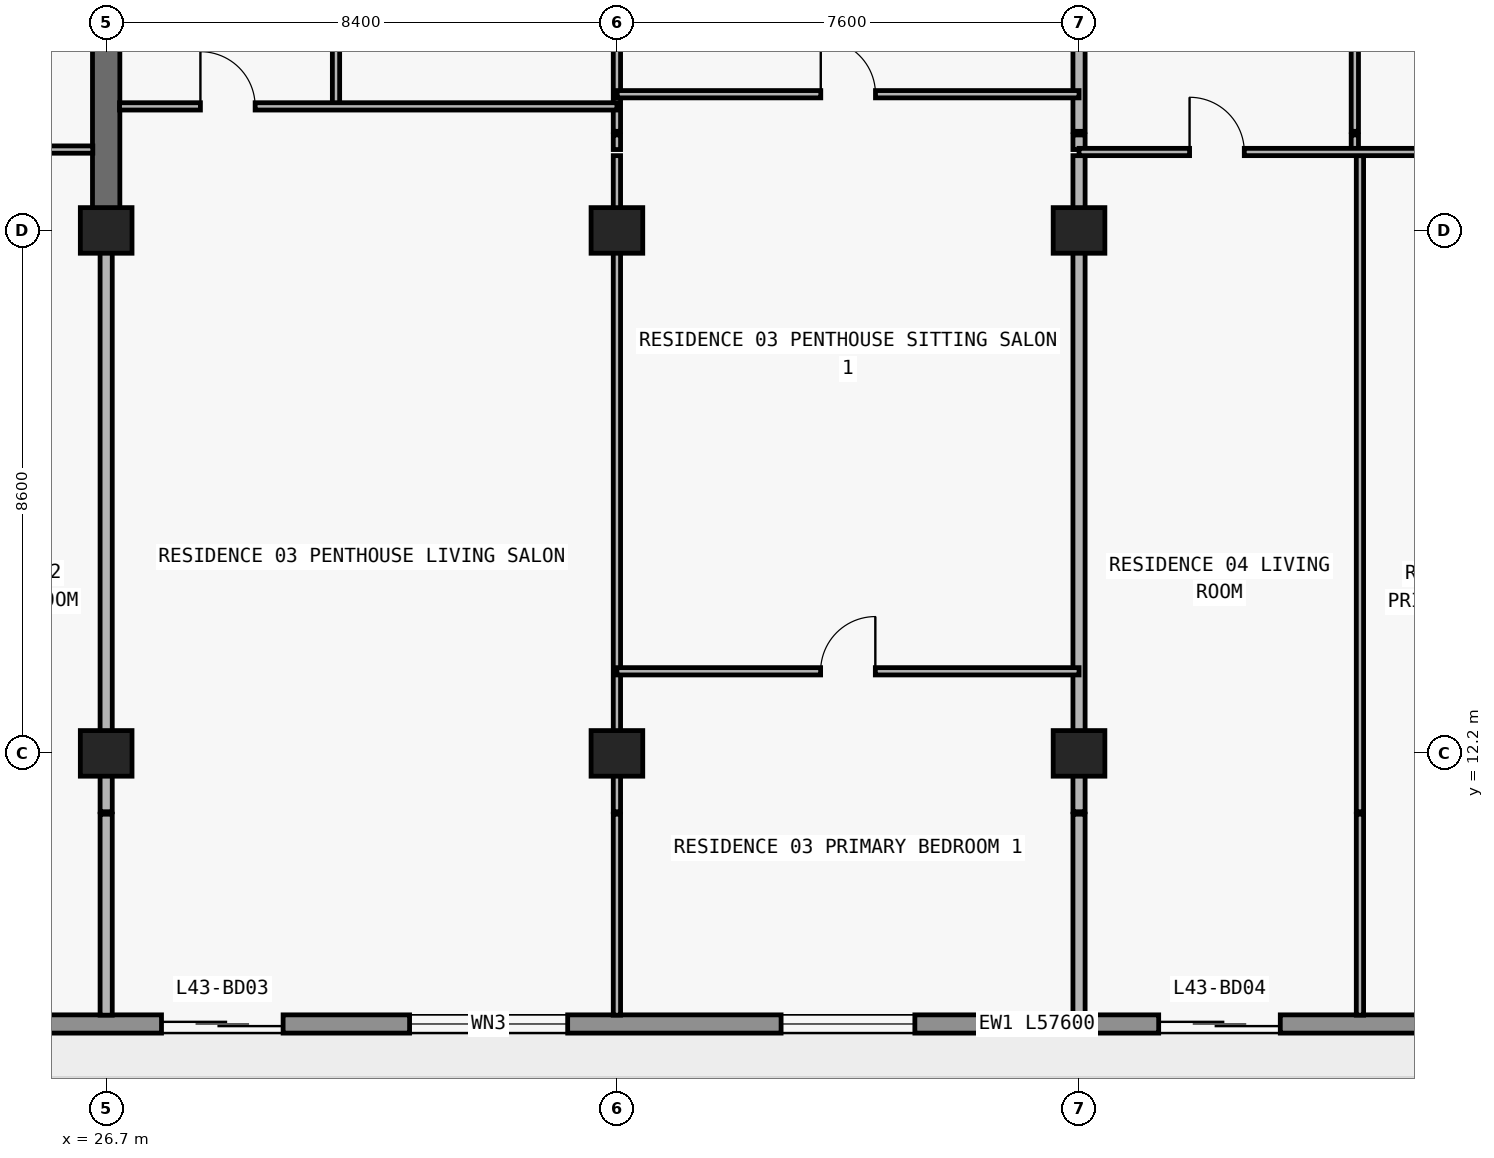
"""IFC4 building model, lengths in metres.
Left out: names, types, materials, properties, quantities, classifications, styles, units other than length and angle.
Written with IfcOpenShell. Run it as: python <this file> out.ifc"""

import sys

from ifc_helpers import new_model, si_unit, direction, frame, frame_2d, origin, origin_2d, place, context, subcontext, project, spatial, rectangle, extrude, element, fill, save


model = new_model("IFC4")
c1 = context("Model", 3, precision=1e-05, world=origin(), true_north=direction((0.0, 1.0)))
c2 = subcontext(c1, "Body", "Model", "MODEL_VIEW")
j1 = project(units=[si_unit("LENGTHUNIT", "METRE"), si_unit("PLANEANGLEUNIT", "RADIAN")], contexts=[c1])
p1 = place(None, origin())
s1 = spatial("IfcSite", under=j1, at=p1, CompositionType="ELEMENT")
p2 = place(p1, origin())
s2 = spatial("IfcBuilding", under=s1, at=p2, CompositionType="ELEMENT")
p3 = place(p2, frame((0.0, 0.0, 157.2)))
s3 = spatial("IfcBuildingStorey", under=s2, at=p3, CompositionType="ELEMENT", Elevation=157.2)
for number, where, z_axis, x_axis in (
    (1, (26.7, 12.2, 0.0), (0.0, 0.0, 1.0), (1.0, 0.0, 0.0)),
    (2, (35.1, 12.2, 0.0), (0.0, 0.0, 1.0), (1.0, 0.0, 0.0)),
    (3, (42.7, 12.2, 0.0), (0.0, 0.0, 1.0), (1.0, 0.0, 0.0)),
    (4, (26.7, 20.8, 0.0), (0.0, 0.0, 1.0), (1.0, 0.0, 0.0)),
    (5, (35.1, 20.8, 0.0), (0.0, 0.0, 1.0), (1.0, 0.0, 0.0)),
    (6, (42.7, 20.8, 0.0), (0.0, 0.0, 1.0), (1.0, 0.0, 0.0)),
):
    element("IfcColumn", number, at=place(p3, frame(where, z_axis=z_axis, x_axis=x_axis)), inside=s3, PredefinedType="COLUMN", context=c2, shape_type="SweptSolid", body=[
        extrude(rectangle(XDim=0.85, YDim=0.75, at=origin_2d()), origin(), (0.0, 0.0, 1.0), 3.05),
    ])
p4 = place(p3, frame((26.7, 20.8, 0.0), z_axis=(0.0, 0.0, 1.0), x_axis=(0.0, 1.0, 0.0)))
e7 = element("IfcWall", 7, at=p4, inside=s3, PredefinedType="SHEAR", context=c2, shape_type="SweptSolid", body=[
    extrude(rectangle(XDim=8.6, YDim=0.45, at=frame_2d((4.3, 0.0))), origin(), (0.0, 0.0, 1.0), 3.05),
])
p5 = place(p3, frame((67.7, 7.75, 0.0), z_axis=(0.0, 0.0, 1.0), x_axis=(-1.0, 0.0, 0.0)))
e8 = element("IfcWall", 8, at=p5, inside=s3, PredefinedType="STANDARD", context=c2, shape_type="SweptSolid", body=[
    extrude(rectangle(XDim=57.6, YDim=0.3, at=frame_2d((28.8, 0.0))), origin(), (0.0, 0.0, 1.0), 3.05),
])
p6 = place(p5, frame((54.673, 0.0, 0.0)))
e9 = element("IfcOpeningElement", 9, at=p6, cuts=e8, PredefinedType="OPENING", context=c2, shape_type="SweptSolid", body=[
    extrude(rectangle(XDim=2.0, YDim=2.3, at=frame_2d((1.0, 1.15))), frame((0.0, 0.16, 0.0), z_axis=(0.0, -1.0, 0.0), x_axis=(1.0, 0.0, 0.0)), (0.0, 0.0, 1.0), 0.32),
])
p7 = place(p5, frame((50.473, 0.0, 0.85)))
e10 = element("IfcOpeningElement", 10, at=p7, cuts=e8, PredefinedType="OPENING", context=c2, shape_type="SweptSolid", body=[
    extrude(rectangle(XDim=2.2, YDim=1.55, at=frame_2d((1.1, 0.775))), frame((0.0, 0.16, 0.0), z_axis=(0.0, -1.0, 0.0), x_axis=(1.0, 0.0, 0.0)), (0.0, 0.0, 1.0), 0.32),
])
p8 = place(p5, frame((46.09, 0.0, 0.0)))
e11 = element("IfcOpeningElement", 11, at=p8, cuts=e8, PredefinedType="OPENING", context=c2, shape_type="SweptSolid", body=[
    extrude(rectangle(XDim=2.0, YDim=2.3, at=frame_2d((1.0, 1.15))), frame((0.0, 0.16, 0.0), z_axis=(0.0, -1.0, 0.0), x_axis=(1.0, 0.0, 0.0)), (0.0, 0.0, 1.0), 0.32),
])
p9 = place(p5, frame((41.99, 0.0, 0.85)))
e12 = element("IfcOpeningElement", 12, at=p9, cuts=e8, PredefinedType="OPENING", context=c2, shape_type="SweptSolid", body=[
    extrude(rectangle(XDim=1.8, YDim=1.55, at=frame_2d((0.9, 0.775))), frame((0.0, 0.16, 0.0), z_axis=(0.0, -1.0, 0.0), x_axis=(1.0, 0.0, 0.0)), (0.0, 0.0, 1.0), 0.32),
])
p10 = place(p5, frame((38.09, 0.0, 0.0)))
e13 = element("IfcOpeningElement", 13, at=p10, cuts=e8, PredefinedType="OPENING", context=c2, shape_type="SweptSolid", body=[
    extrude(rectangle(XDim=2.0, YDim=2.3, at=frame_2d((1.0, 1.15))), frame((0.0, 0.16, 0.0), z_axis=(0.0, -1.0, 0.0), x_axis=(1.0, 0.0, 0.0)), (0.0, 0.0, 1.0), 0.32),
])
p11 = place(p5, frame((33.41, 0.0, 0.65)))
e14 = element("IfcOpeningElement", 14, at=p11, cuts=e8, PredefinedType="OPENING", context=c2, shape_type="SweptSolid", body=[
    extrude(rectangle(XDim=2.6, YDim=1.85, at=frame_2d((1.3, 0.925))), frame((0.0, 0.16, 0.0), z_axis=(0.0, -1.0, 0.0), x_axis=(1.0, 0.0, 0.0)), (0.0, 0.0, 1.0), 0.32),
])
p12 = place(p5, frame((27.7, 0.0, 0.85)))
e15 = element("IfcOpeningElement", 15, at=p12, cuts=e8, PredefinedType="OPENING", context=c2, shape_type="SweptSolid", body=[
    extrude(rectangle(XDim=2.2, YDim=1.55, at=frame_2d((1.1, 0.775))), frame((0.0, 0.16, 0.0), z_axis=(0.0, -1.0, 0.0), x_axis=(1.0, 0.0, 0.0)), (0.0, 0.0, 1.0), 0.32),
])
p13 = place(p5, frame((21.69, 0.0, 0.0)))
e16 = element("IfcOpeningElement", 16, at=p13, cuts=e8, PredefinedType="OPENING", context=c2, shape_type="SweptSolid", body=[
    extrude(rectangle(XDim=2.0, YDim=2.3, at=frame_2d((1.0, 1.15))), frame((0.0, 0.16, 0.0), z_axis=(0.0, -1.0, 0.0), x_axis=(1.0, 0.0, 0.0)), (0.0, 0.0, 1.0), 0.32),
])
p14 = place(p5, frame((17.59, 0.0, 0.85)))
e17 = element("IfcOpeningElement", 17, at=p14, cuts=e8, PredefinedType="OPENING", context=c2, shape_type="SweptSolid", body=[
    extrude(rectangle(XDim=1.8, YDim=1.55, at=frame_2d((0.9, 0.775))), frame((0.0, 0.16, 0.0), z_axis=(0.0, -1.0, 0.0), x_axis=(1.0, 0.0, 0.0)), (0.0, 0.0, 1.0), 0.32),
])
p15 = place(p5, frame((13.626, 0.0, 0.0)))
e18 = element("IfcOpeningElement", 18, at=p15, cuts=e8, PredefinedType="OPENING", context=c2, shape_type="SweptSolid", body=[
    extrude(rectangle(XDim=2.0, YDim=2.3, at=frame_2d((1.0, 1.15))), frame((0.0, 0.16, 0.0), z_axis=(0.0, -1.0, 0.0), x_axis=(1.0, 0.0, 0.0)), (0.0, 0.0, 1.0), 0.32),
])
p16 = place(p5, frame((9.326, 0.0, 0.85)))
e19 = element("IfcOpeningElement", 19, at=p16, cuts=e8, PredefinedType="OPENING", context=c2, shape_type="SweptSolid", body=[
    extrude(rectangle(XDim=2.2, YDim=1.55, at=frame_2d((1.1, 0.775))), frame((0.0, 0.16, 0.0), z_axis=(0.0, -1.0, 0.0), x_axis=(1.0, 0.0, 0.0)), (0.0, 0.0, 1.0), 0.32),
])
p17 = place(p5, frame((4.945, 0.0, 0.0)))
e20 = element("IfcOpeningElement", 20, at=p17, cuts=e8, PredefinedType="OPENING", context=c2, shape_type="SweptSolid", body=[
    extrude(rectangle(XDim=2.0, YDim=2.3, at=frame_2d((1.0, 1.15))), frame((0.0, 0.16, 0.0), z_axis=(0.0, -1.0, 0.0), x_axis=(1.0, 0.0, 0.0)), (0.0, 0.0, 1.0), 0.32),
])
p18 = place(p5, frame((0.945, 0.0, 0.85)))
e21 = element("IfcOpeningElement", 21, at=p18, cuts=e8, PredefinedType="OPENING", context=c2, shape_type="SweptSolid", body=[
    extrude(rectangle(XDim=1.8, YDim=1.55, at=frame_2d((0.9, 0.775))), frame((0.0, 0.16, 0.0), z_axis=(0.0, -1.0, 0.0), x_axis=(1.0, 0.0, 0.0)), (0.0, 0.0, 1.0), 0.32),
])
p19 = place(p3, frame((26.7, 7.895, 0.0), z_axis=(0.0, 0.0, 1.0), x_axis=(0.0, 1.0, 0.0)))
e22 = element("IfcWall", 22, at=p19, inside=s3, PredefinedType="PARTITIONING", context=c2, shape_type="SweptSolid", body=[
    extrude(rectangle(XDim=3.305, YDim=0.2, at=frame_2d((1.652, 0.0))), origin(), (0.0, 0.0, 1.0), 3.05),
])
p20 = place(p3, frame((26.7, 11.24, 0.0), z_axis=(0.0, 0.0, 1.0), x_axis=(0.0, 1.0, 0.0)))
e23 = element("IfcWall", 23, at=p20, inside=s3, PredefinedType="PARTITIONING", context=c2, shape_type="SweptSolid", body=[
    extrude(rectangle(XDim=9.555, YDim=0.2, at=frame_2d((4.777, 0.0))), origin(), (0.0, 0.0, 1.0), 2.263),
])
p21 = place(p3, frame((30.48, 22.84, 0.0), z_axis=(0.0, 0.0, 1.0), x_axis=(0.0, 1.0, 0.0)))
e24 = element("IfcWall", 24, at=p21, inside=s3, PredefinedType="PARTITIONING", context=c2, shape_type="SweptSolid", body=[
    extrude(rectangle(XDim=4.34, YDim=0.12, at=frame_2d((2.17, 0.0))), origin(), (0.0, 0.0, 1.0), 3.05),
])
p22 = place(p21, frame((1.72, 0.0, 0.0)))
e25 = element("IfcOpeningElement", 25, at=p22, cuts=e24, PredefinedType="OPENING", context=c2, shape_type="SweptSolid", body=[
    extrude(rectangle(XDim=0.9, YDim=2.15, at=frame_2d((0.45, 1.075))), frame((0.0, 0.07, 0.0), z_axis=(0.0, -1.0, 0.0), x_axis=(1.0, 0.0, 0.0)), (0.0, 0.0, 1.0), 0.14),
])
p23 = place(p3, frame((35.1, 7.895, 0.0), z_axis=(0.0, 0.0, 1.0), x_axis=(0.0, 1.0, 0.0)))
e26 = element("IfcWall", 26, at=p23, inside=s3, PredefinedType="PARTITIONING", context=c2, shape_type="SweptSolid", body=[
    extrude(rectangle(XDim=3.305, YDim=0.12, at=frame_2d((1.652, 0.0))), origin(), (0.0, 0.0, 1.0), 3.05),
])
p24 = place(p3, frame((35.1, 11.24, 0.0), z_axis=(0.0, 0.0, 1.0), x_axis=(0.0, 1.0, 0.0)))
e27 = element("IfcWall", 27, at=p24, inside=s3, PredefinedType="PARTITIONING", context=c2, shape_type="SweptSolid", body=[
    extrude(rectangle(XDim=10.79, YDim=0.12, at=frame_2d((5.395, 0.0))), origin(), (0.0, 0.0, 1.0), 2.263),
])
p25 = place(p3, frame((35.1, 22.13, 0.0), z_axis=(0.0, 0.0, 1.0), x_axis=(0.0, 1.0, 0.0)))
e28 = element("IfcWall", 28, at=p25, inside=s3, PredefinedType="PARTITIONING", context=c2, shape_type="SweptSolid", body=[
    extrude(rectangle(XDim=0.24, YDim=0.12, at=frame_2d((0.12, 0.0))), origin(), (0.0, 0.0, 1.0), 2.263),
])
p26 = place(p3, frame((35.1, 22.43, 0.0), z_axis=(0.0, 0.0, 1.0), x_axis=(0.0, 1.0, 0.0)))
e29 = element("IfcWall", 29, at=p26, inside=s3, PredefinedType="PARTITIONING", context=c2, shape_type="SweptSolid", body=[
    extrude(rectangle(XDim=4.75, YDim=0.12, at=frame_2d((2.375, 0.0))), origin(), (0.0, 0.0, 1.0), 2.263),
])
p27 = place(p26, frame((2.23, 0.0, 0.0)))
e30 = element("IfcOpeningElement", 30, at=p27, cuts=e29, PredefinedType="OPENING", context=c2, shape_type="SweptSolid", body=[
    extrude(rectangle(XDim=0.9, YDim=2.15, at=frame_2d((0.45, 1.075))), frame((0.0, 0.07, 0.0), z_axis=(0.0, -1.0, 0.0), x_axis=(1.0, 0.0, 0.0)), (0.0, 0.0, 1.0), 0.14),
])
p28 = place(p3, frame((42.7, 7.895, 0.0), z_axis=(0.0, 0.0, 1.0), x_axis=(0.0, 1.0, 0.0)))
e31 = element("IfcWall", 31, at=p28, inside=s3, PredefinedType="PARTITIONING", context=c2, shape_type="SweptSolid", body=[
    extrude(rectangle(XDim=3.305, YDim=0.2, at=frame_2d((1.652, 0.0))), origin(), (0.0, 0.0, 1.0), 3.05),
])
p29 = place(p3, frame((42.7, 11.24, 0.0), z_axis=(0.0, 0.0, 1.0), x_axis=(0.0, 1.0, 0.0)))
e32 = element("IfcWall", 32, at=p29, inside=s3, PredefinedType="PARTITIONING", context=c2, shape_type="SweptSolid", body=[
    extrude(rectangle(XDim=10.79, YDim=0.2, at=frame_2d((5.395, 0.0))), origin(), (0.0, 0.0, 1.0), 2.263),
])
p30 = place(p3, frame((42.7, 22.13, 0.0), z_axis=(0.0, 0.0, 1.0), x_axis=(0.0, 1.0, 0.0)))
e33 = element("IfcWall", 33, at=p30, inside=s3, PredefinedType="PARTITIONING", context=c2, shape_type="SweptSolid", body=[
    extrude(rectangle(XDim=0.24, YDim=0.2, at=frame_2d((0.12, 0.0))), origin(), (0.0, 0.0, 1.0), 2.263),
])
p31 = place(p3, frame((42.7, 22.43, 0.0), z_axis=(0.0, 0.0, 1.0), x_axis=(0.0, 1.0, 0.0)))
e34 = element("IfcWall", 34, at=p31, inside=s3, PredefinedType="PARTITIONING", context=c2, shape_type="SweptSolid", body=[
    extrude(rectangle(XDim=4.75, YDim=0.2, at=frame_2d((2.375, 0.0))), origin(), (0.0, 0.0, 1.0), 2.263),
])
p32 = place(p3, frame((47.236, 22.13, 0.0), z_axis=(0.0, 0.0, 1.0), x_axis=(0.0, 1.0, 0.0)))
e35 = element("IfcWall", 35, at=p32, inside=s3, PredefinedType="PARTITIONING", context=c2, shape_type="SweptSolid", body=[
    extrude(rectangle(XDim=0.24, YDim=0.12, at=frame_2d((0.12, 0.0))), origin(), (0.0, 0.0, 1.0), 3.05),
])
p33 = place(p3, frame((47.236, 22.43, 0.0), z_axis=(0.0, 0.0, 1.0), x_axis=(0.0, 1.0, 0.0)))
e36 = element("IfcWall", 36, at=p33, inside=s3, PredefinedType="PARTITIONING", context=c2, shape_type="SweptSolid", body=[
    extrude(rectangle(XDim=4.75, YDim=0.12, at=frame_2d((2.375, 0.0))), origin(), (0.0, 0.0, 1.0), 3.05),
])
p34 = place(p33, frame((1.925, 0.0, 0.0)))
e37 = element("IfcOpeningElement", 37, at=p34, cuts=e36, PredefinedType="OPENING", context=c2, shape_type="SweptSolid", body=[
    extrude(rectangle(XDim=0.9, YDim=2.15, at=frame_2d((0.45, 1.075))), frame((0.0, 0.07, 0.0), z_axis=(0.0, -1.0, 0.0), x_axis=(1.0, 0.0, 0.0)), (0.0, 0.0, 1.0), 0.14),
])
p35 = place(p3, frame((47.32, 7.895, 0.0), z_axis=(0.0, 0.0, 1.0), x_axis=(0.0, 1.0, 0.0)))
e38 = element("IfcWall", 38, at=p35, inside=s3, PredefinedType="PARTITIONING", context=c2, shape_type="SweptSolid", body=[
    extrude(rectangle(XDim=3.305, YDim=0.12, at=frame_2d((1.652, 0.0))), origin(), (0.0, 0.0, 1.0), 3.05),
])
p36 = place(p3, frame((47.32, 11.24, 0.0), z_axis=(0.0, 0.0, 1.0), x_axis=(0.0, 1.0, 0.0)))
e39 = element("IfcWall", 39, at=p36, inside=s3, PredefinedType="PARTITIONING", context=c2, shape_type="SweptSolid", body=[
    extrude(rectangle(XDim=10.79, YDim=0.12, at=frame_2d((5.395, 0.0))), origin(), (0.0, 0.0, 1.0), 3.05),
])
p37 = place(p3, frame((35.1, 13.55, 0.0), z_axis=(0.0, 0.0, 1.0), x_axis=(1.0, 0.0, 0.0)))
e40 = element("IfcWall", 40, at=p37, inside=s3, PredefinedType="PARTITIONING", context=c2, shape_type="SweptSolid", body=[
    extrude(rectangle(XDim=7.6, YDim=0.12, at=frame_2d((3.8, 0.0))), origin(), (0.0, 0.0, 1.0), 3.05),
])
p38 = place(p37, frame((3.35, 0.0, 0.0)))
e41 = element("IfcOpeningElement", 41, at=p38, cuts=e40, PredefinedType="OPENING", context=c2, shape_type="SweptSolid", body=[
    extrude(rectangle(XDim=0.9, YDim=2.15, at=frame_2d((0.45, 1.075))), frame((0.0, 0.07, 0.0), z_axis=(0.0, -1.0, 0.0), x_axis=(1.0, 0.0, 0.0)), (0.0, 0.0, 1.0), 0.14),
])
p39 = place(p3, frame((42.7, 22.09, 0.0), z_axis=(0.0, 0.0, 1.0), x_axis=(1.0, 0.0, 0.0)))
e42 = element("IfcWall", 42, at=p39, inside=s3, PredefinedType="PARTITIONING", context=c2, shape_type="SweptSolid", body=[
    extrude(rectangle(XDim=8.18, YDim=0.12, at=frame_2d((4.09, 0.0))), origin(), (0.0, 0.0, 1.0), 3.05),
])
p40 = place(p39, frame((1.818, 0.0, 0.0)))
e43 = element("IfcOpeningElement", 43, at=p40, cuts=e42, PredefinedType="OPENING", context=c2, shape_type="SweptSolid", body=[
    extrude(rectangle(XDim=0.9, YDim=2.15, at=frame_2d((0.45, 1.075))), frame((0.0, 0.07, 0.0), z_axis=(0.0, -1.0, 0.0), x_axis=(1.0, 0.0, 0.0)), (0.0, 0.0, 1.0), 0.14),
])
p41 = place(p39, frame((5.95, 0.0, 0.0)))
e44 = element("IfcOpeningElement", 44, at=p41, cuts=e42, PredefinedType="OPENING", context=c2, shape_type="SweptSolid", body=[
    extrude(rectangle(XDim=0.9, YDim=2.15, at=frame_2d((0.45, 1.075))), frame((0.0, 0.07, 0.0), z_axis=(0.0, -1.0, 0.0), x_axis=(1.0, 0.0, 0.0)), (0.0, 0.0, 1.0), 0.14),
])
p42 = place(p3, frame((18.3, 22.13, 0.0), z_axis=(0.0, 0.0, 1.0), x_axis=(1.0, 0.0, 0.0)))
e45 = element("IfcWall", 45, at=p42, inside=s3, PredefinedType="PARTITIONING", context=c2, shape_type="SweptSolid", body=[
    extrude(rectangle(XDim=8.18, YDim=0.12, at=frame_2d((4.09, 0.0))), origin(), (0.0, 0.0, 1.0), 3.05),
])
p43 = place(p42, frame((1.86, 0.0, 0.0)))
e46 = element("IfcOpeningElement", 46, at=p43, cuts=e45, PredefinedType="OPENING", context=c2, shape_type="SweptSolid", body=[
    extrude(rectangle(XDim=0.9, YDim=2.15, at=frame_2d((0.45, 1.075))), frame((0.0, 0.07, 0.0), z_axis=(0.0, -1.0, 0.0), x_axis=(1.0, 0.0, 0.0)), (0.0, 0.0, 1.0), 0.14),
])
p44 = place(p42, frame((6.033, 0.0, 0.0)))
e47 = element("IfcOpeningElement", 47, at=p44, cuts=e45, PredefinedType="OPENING", context=c2, shape_type="SweptSolid", body=[
    extrude(rectangle(XDim=0.9, YDim=2.15, at=frame_2d((0.45, 1.075))), frame((0.0, 0.07, 0.0), z_axis=(0.0, -1.0, 0.0), x_axis=(1.0, 0.0, 0.0)), (0.0, 0.0, 1.0), 0.14),
])
p45 = place(p3, frame((26.92, 22.84, 0.0), z_axis=(0.0, 0.0, 1.0), x_axis=(1.0, 0.0, 0.0)))
e48 = element("IfcWall", 48, at=p45, inside=s3, PredefinedType="PARTITIONING", context=c2, shape_type="SweptSolid", body=[
    extrude(rectangle(XDim=8.18, YDim=0.12, at=frame_2d((4.09, 0.0))), origin(), (0.0, 0.0, 1.0), 3.05),
])
p46 = place(p45, frame((1.33, 0.0, 0.0)))
e49 = element("IfcOpeningElement", 49, at=p46, cuts=e48, PredefinedType="OPENING", context=c2, shape_type="SweptSolid", body=[
    extrude(rectangle(XDim=0.9, YDim=2.15, at=frame_2d((0.45, 1.075))), frame((0.0, 0.07, 0.0), z_axis=(0.0, -1.0, 0.0), x_axis=(1.0, 0.0, 0.0)), (0.0, 0.0, 1.0), 0.14),
])
p47 = place(p3, frame((35.105, 23.04, 0.0), z_axis=(0.0, 0.0, 1.0), x_axis=(1.0, 0.0, 0.0)))
e50 = element("IfcWall", 50, at=p47, inside=s3, PredefinedType="PARTITIONING", context=c2, shape_type="SweptSolid", body=[
    extrude(rectangle(XDim=7.595, YDim=0.12, at=frame_2d((3.797, 0.0))), origin(), (0.0, 0.0, 1.0), 3.05),
])
p48 = place(p47, frame((3.347, 0.0, 0.0)))
e51 = element("IfcOpeningElement", 51, at=p48, cuts=e50, PredefinedType="OPENING", context=c2, shape_type="SweptSolid", body=[
    extrude(rectangle(XDim=0.9, YDim=2.15, at=frame_2d((0.45, 1.075))), frame((0.0, 0.07, 0.0), z_axis=(0.0, -1.0, 0.0), x_axis=(1.0, 0.0, 0.0)), (0.0, 0.0, 1.0), 0.14),
])
p49 = place(p10, origin())
e52 = element("IfcDoor", 52, at=p49, inside=s3, OperationType="DOUBLE_DOOR_SLIDING", PredefinedType="DOOR", context=c2, shape_type="SweptSolid", body=[
    extrude(rectangle(XDim=2.0, YDim=2.3, at=frame_2d((1.0, 1.15))), frame((0.0, 0.025, 0.0), z_axis=(0.0, -1.0, 0.0), x_axis=(1.0, 0.0, 0.0)), (0.0, 0.0, 1.0), 0.05),
])
fill(e13, e52)
p50 = place(p11, origin())
e53 = element("IfcWindow", 53, at=p50, inside=s3, PartitioningType="SINGLE_PANEL", PredefinedType="WINDOW", context=c2, shape_type="SweptSolid", body=[
    extrude(rectangle(XDim=2.6, YDim=1.85, at=frame_2d((1.3, 0.925))), frame((0.0, 0.03, 0.0), z_axis=(0.0, -1.0, 0.0), x_axis=(1.0, 0.0, 0.0)), (0.0, 0.0, 1.0), 0.06),
])
fill(e14, e53)
p51 = place(p12, origin())
e54 = element("IfcWindow", 54, at=p51, inside=s3, PartitioningType="SINGLE_PANEL", PredefinedType="WINDOW", context=c2, shape_type="SweptSolid", body=[
    extrude(rectangle(XDim=2.2, YDim=1.55, at=frame_2d((1.1, 0.775))), frame((0.0, 0.03, 0.0), z_axis=(0.0, -1.0, 0.0), x_axis=(1.0, 0.0, 0.0)), (0.0, 0.0, 1.0), 0.06),
])
fill(e15, e54)
p52 = place(p13, origin())
e55 = element("IfcDoor", 55, at=p52, inside=s3, OperationType="DOUBLE_DOOR_SLIDING", PredefinedType="DOOR", context=c2, shape_type="SweptSolid", body=[
    extrude(rectangle(XDim=2.0, YDim=2.3, at=frame_2d((1.0, 1.15))), frame((0.0, 0.025, 0.0), z_axis=(0.0, -1.0, 0.0), x_axis=(1.0, 0.0, 0.0)), (0.0, 0.0, 1.0), 0.05),
])
fill(e16, e55)
p53 = place(p46, origin())
e56 = element("IfcDoor", 56, at=p53, inside=s3, OperationType="SINGLE_SWING_LEFT", PredefinedType="DOOR", context=c2, shape_type="SweptSolid", body=[
    extrude(rectangle(XDim=0.9, YDim=2.15, at=frame_2d((0.45, 1.075))), frame((0.0, 0.025, 0.0), z_axis=(0.0, -1.0, 0.0), x_axis=(1.0, 0.0, 0.0)), (0.0, 0.0, 1.0), 0.05),
])
fill(e49, e56)
p54 = place(p48, origin())
e57 = element("IfcDoor", 57, at=p54, inside=s3, OperationType="SINGLE_SWING_LEFT", PredefinedType="DOOR", context=c2, shape_type="SweptSolid", body=[
    extrude(rectangle(XDim=0.9, YDim=2.15, at=frame_2d((0.45, 1.075))), frame((0.0, 0.025, 0.0), z_axis=(0.0, -1.0, 0.0), x_axis=(1.0, 0.0, 0.0)), (0.0, 0.0, 1.0), 0.05),
])
fill(e51, e57)
p55 = place(p38, origin())
e58 = element("IfcDoor", 58, at=p55, inside=s3, OperationType="SINGLE_SWING_RIGHT", PredefinedType="DOOR", context=c2, shape_type="SweptSolid", body=[
    extrude(rectangle(XDim=0.9, YDim=2.15, at=frame_2d((0.45, 1.075))), frame((0.0, 0.025, 0.0), z_axis=(0.0, -1.0, 0.0), x_axis=(1.0, 0.0, 0.0)), (0.0, 0.0, 1.0), 0.05),
])
fill(e41, e58)
p56 = place(p40, origin())
e59 = element("IfcDoor", 59, at=p56, inside=s3, OperationType="SINGLE_SWING_LEFT", PredefinedType="DOOR", context=c2, shape_type="SweptSolid", body=[
    extrude(rectangle(XDim=0.9, YDim=2.15, at=frame_2d((0.45, 1.075))), frame((0.0, 0.025, 0.0), z_axis=(0.0, -1.0, 0.0), x_axis=(1.0, 0.0, 0.0)), (0.0, 0.0, 1.0), 0.05),
])
fill(e43, e59)
save(model, sys.argv[1])
